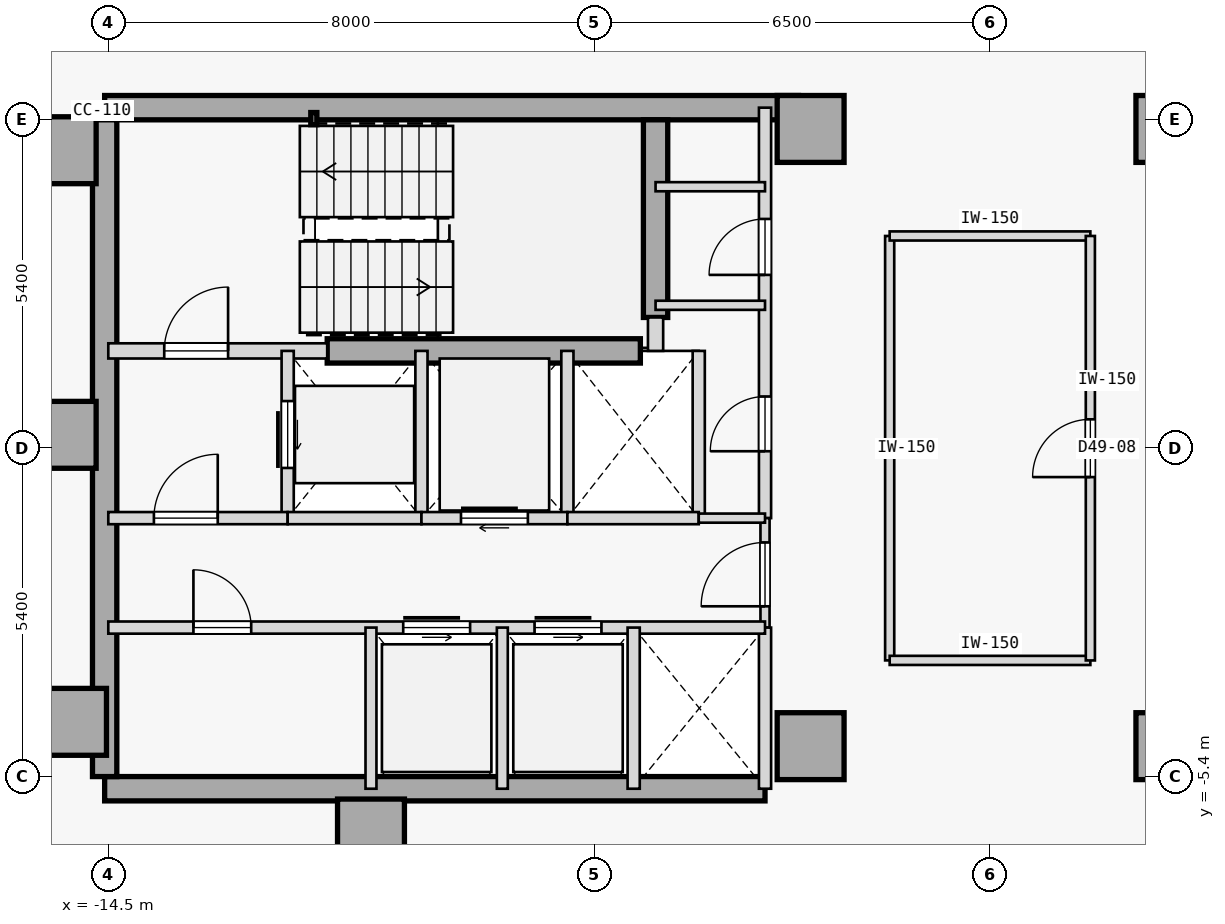
"""IFC4 building model, lengths in metres.
Left out: names, types, materials, properties, quantities, classifications, styles, units other than length and angle.
Written with IfcOpenShell. Run it as: python <this file> out.ifc"""

import sys

from ifc_helpers import new_model, si_unit, direction, frame, frame_2d, origin, origin_2d, place, context, subcontext, project, spatial, rectangle, hollow_rectangle, extrude, element, fill, save


model = new_model("IFC4")
c1 = context("Model", 3, precision=1e-05, world=origin(), true_north=direction((0.0, 1.0)))
c2 = subcontext(c1, "Body", "Model", "MODEL_VIEW")
j1 = project(units=[si_unit("LENGTHUNIT", "METRE"), si_unit("PLANEANGLEUNIT", "RADIAN")], contexts=[c1])
p1 = place(None, origin())
s1 = spatial("IfcSite", under=j1, at=p1, CompositionType="ELEMENT")
p2 = place(p1, origin())
s2 = spatial("IfcBuilding", under=s1, at=p2, CompositionType="ELEMENT")
p3 = place(p2, frame((0.0, 0.0, 188.8)))
s3 = spatial("IfcBuildingStorey", under=s2, at=p3, CompositionType="ELEMENT", Elevation=188.8)
for number, where, z_axis, x_axis in (
    (1, (-15.25, 4.9, 0.0), (0.0, 0.0, 1.0), (1.0, 0.0, 0.0)),
    (2, (-15.25, 0.22, 0.0), (0.0, 0.0, 1.0), (1.0, 0.0, 0.0)),
    (3, (-15.08, -4.5, 0.0), (0.0, 0.0, 1.0), (1.0, 0.0, 0.0)),
    (4, (-10.18, -6.32, 0.0), (0.0, 0.0, 1.0), (1.0, 0.0, 0.0)),
    (5, (-2.95, -4.9, 0.0), (0.0, 0.0, 1.0), (1.0, 0.0, 0.0)),
    (6, (-2.95, 5.25, 0.0), (0.0, 0.0, 1.0), (1.0, 0.0, 0.0)),
    (7, (2.95, -4.9, 0.0), (0.0, 0.0, 1.0), (1.0, 0.0, 0.0)),
    (8, (2.95, 5.25, 0.0), (0.0, 0.0, 1.0), (1.0, 0.0, 0.0)),
):
    element("IfcColumn", number, at=place(p3, frame(where, z_axis=z_axis, x_axis=x_axis)), inside=s3, PredefinedType="COLUMN", context=c2, shape_type="SweptSolid", body=[
        extrude(rectangle(XDim=1.1, YDim=1.1, at=origin_2d()), origin(), (0.0, 0.0, 1.0), 3.4),
    ])
p4 = place(p3, frame((-14.56, 5.6, 0.0), z_axis=(0.0, 0.0, 1.0), x_axis=(1.0, 0.0, 0.0)))
e9 = element("IfcWall", 9, at=p4, inside=s3, PredefinedType="SHEAR", context=c2, shape_type="SweptSolid", body=[
    extrude(rectangle(XDim=11.41, YDim=0.4, at=frame_2d((5.705, 0.0))), origin(), (0.0, 0.0, 1.0), 3.175),
])
p5 = place(p3, frame((-14.56, -5.6, 0.0), z_axis=(0.0, 0.0, 1.0), x_axis=(1.0, 0.0, 0.0)))
e10 = element("IfcWall", 10, at=p5, inside=s3, PredefinedType="SHEAR", context=c2, shape_type="SweptSolid", body=[
    extrude(rectangle(XDim=10.86, YDim=0.4, at=frame_2d((5.43, 0.0))), origin(), (0.0, 0.0, 1.0), 3.175),
])
p6 = place(p3, frame((-14.56, -5.4, 0.0), z_axis=(0.0, 0.0, 1.0), x_axis=(0.0, 1.0, 0.0)))
e11 = element("IfcWall", 11, at=p6, inside=s3, PredefinedType="SHEAR", context=c2, shape_type="SweptSolid", body=[
    extrude(rectangle(XDim=10.8, YDim=0.4, at=frame_2d((5.4, 0.0))), origin(), (0.0, 0.0, 1.0), 3.175),
])
p7 = place(p3, frame((-5.5, 2.15, 0.0), z_axis=(0.0, 0.0, 1.0), x_axis=(0.0, 1.0, 0.0)))
e12 = element("IfcWall", 12, at=p7, inside=s3, PredefinedType="SHEAR", context=c2, shape_type="SweptSolid", body=[
    extrude(rectangle(XDim=3.25, YDim=0.4, at=frame_2d((1.625, 0.0))), origin(), (0.0, 0.0, 1.0), 3.175),
])
p8 = place(p3, frame((-10.9, 1.6, 0.0), z_axis=(0.0, 0.0, 1.0), x_axis=(1.0, 0.0, 0.0)))
e13 = element("IfcWall", 13, at=p8, inside=s3, PredefinedType="SHEAR", context=c2, shape_type="SweptSolid", body=[
    extrude(rectangle(XDim=5.15, YDim=0.4, at=frame_2d((2.575, 0.0))), origin(), (0.0, 0.0, 1.0), 3.175),
])
p9 = place(p3, frame((-11.12, 5.42, 0.0), z_axis=(0.0, 0.0, 1.0), x_axis=(1.0, 0.0, 0.0)))
e14 = element("IfcColumn", 14, at=p9, inside=s3, PredefinedType="COLUMN", context=c2, shape_type="SweptSolid", body=[
    extrude(hollow_rectangle(XDim=0.1, YDim=0.2, WallThickness=0.008, at=origin_2d()), origin(), (0.0, 0.0, 1.0), 3.4),
])
p10 = place(p3, frame((-14.5, 1.6, 0.0), z_axis=(0.0, 0.0, 1.0), x_axis=(1.0, 0.0, 0.0)))
e15 = element("IfcWall", 15, at=p10, inside=s3, PredefinedType="STANDARD", context=c2, shape_type="SweptSolid", body=[
    extrude(rectangle(XDim=3.6, YDim=0.25, at=frame_2d((1.8, 0.0))), origin(), (0.0, 0.0, 1.0), 3.175),
])
p11 = place(p10, frame((0.92, 0.0, 0.0)))
e16 = element("IfcOpeningElement", 16, at=p11, cuts=e15, PredefinedType="OPENING", context=c2, shape_type="SweptSolid", body=[
    extrude(rectangle(XDim=1.05, YDim=2.15, at=frame_2d((0.525, 1.075))), frame((0.0, 0.135, 0.0), z_axis=(0.0, -1.0, 0.0), x_axis=(1.0, 0.0, 0.0)), (0.0, 0.0, 1.0), 0.27),
])
p12 = place(p3, frame((-5.5, 1.6, 0.0), z_axis=(0.0, 0.0, 1.0), x_axis=(0.0, 1.0, 0.0)))
e17 = element("IfcWall", 17, at=p12, inside=s3, PredefinedType="STANDARD", context=c2, shape_type="SweptSolid", body=[
    extrude(rectangle(XDim=0.55, YDim=0.25, at=frame_2d((0.275, 0.0))), origin(), (0.0, 0.0, 1.0), 3.175),
])
p13 = place(p3, frame((-3.7, -1.15, 0.0), z_axis=(0.0, 0.0, 1.0), x_axis=(0.0, 1.0, 0.0)))
e18 = element("IfcWall", 18, at=p13, inside=s3, PredefinedType="STANDARD", context=c2, shape_type="SweptSolid", body=[
    extrude(rectangle(XDim=6.75, YDim=0.2, at=frame_2d((3.375, 0.0))), origin(), (0.0, 0.0, 1.0), 3.175),
])
p14 = place(p13, frame((1.1, 0.0, 0.0)))
e19 = element("IfcOpeningElement", 19, at=p14, cuts=e18, PredefinedType="OPENING", context=c2, shape_type="SweptSolid", body=[
    extrude(rectangle(XDim=0.9, YDim=2.15, at=frame_2d((0.45, 1.075))), frame((0.0, 0.11, 0.0), z_axis=(0.0, -1.0, 0.0), x_axis=(1.0, 0.0, 0.0)), (0.0, 0.0, 1.0), 0.22),
])
p15 = place(p13, frame((4.0, 0.0, 0.0)))
e20 = element("IfcOpeningElement", 20, at=p15, cuts=e18, PredefinedType="OPENING", context=c2, shape_type="SweptSolid", body=[
    extrude(rectangle(XDim=0.92, YDim=2.15, at=frame_2d((0.46, 1.075))), frame((0.0, 0.11, 0.0), z_axis=(0.0, -1.0, 0.0), x_axis=(1.0, 0.0, 0.0)), (0.0, 0.0, 1.0), 0.22),
])
p16 = place(p3, frame((-3.7, -2.95, 0.0), z_axis=(0.0, 0.0, 1.0), x_axis=(0.0, 1.0, 0.0)))
e21 = element("IfcWall", 21, at=p16, inside=s3, PredefinedType="PARTITIONING", context=c2, shape_type="SweptSolid", body=[
    extrude(rectangle(XDim=1.8, YDim=0.15, at=frame_2d((0.9, 0.0))), origin(), (0.0, 0.0, 1.0), 3.175),
])
p17 = place(p16, frame((0.35, 0.0, 0.0)))
e22 = element("IfcOpeningElement", 22, at=p17, cuts=e21, PredefinedType="OPENING", context=c2, shape_type="SweptSolid", body=[
    extrude(rectangle(XDim=1.05, YDim=2.18, at=frame_2d((0.525, 1.09))), frame((0.0, 0.085, 0.0), z_axis=(0.0, -1.0, 0.0), x_axis=(1.0, 0.0, 0.0)), (0.0, 0.0, 1.0), 0.17),
])
p18 = place(p3, frame((-3.7, -5.6, 0.0), z_axis=(0.0, 0.0, 1.0), x_axis=(0.0, 1.0, 0.0)))
e23 = element("IfcWall", 23, at=p18, inside=s3, PredefinedType="STANDARD", context=c2, shape_type="SweptSolid", body=[
    extrude(rectangle(XDim=2.65, YDim=0.2, at=frame_2d((1.325, 0.0))), origin(), (0.0, 0.0, 1.0), 3.175),
])
p19 = place(p3, frame((-11.55, -1.15, 0.0), z_axis=(0.0, 0.0, 1.0), x_axis=(0.0, 1.0, 0.0)))
e24 = element("IfcWall", 24, at=p19, inside=s3, PredefinedType="STANDARD", context=c2, shape_type="SweptSolid", body=[
    extrude(rectangle(XDim=2.75, YDim=0.2, at=frame_2d((1.375, 0.0))), origin(), (0.0, 0.0, 1.0), 3.175),
])
p20 = place(p19, frame((0.825, 0.0, 0.0)))
e25 = element("IfcOpeningElement", 25, at=p20, cuts=e24, PredefinedType="OPENING", context=c2, shape_type="SweptSolid", body=[
    extrude(rectangle(XDim=1.1, YDim=2.15, at=frame_2d((0.55, 1.075))), frame((0.0, 0.11, 0.0), z_axis=(0.0, -1.0, 0.0), x_axis=(1.0, 0.0, 0.0)), (0.0, 0.0, 1.0), 0.22),
])
p21 = place(p3, frame((-9.35, -1.15, 0.0), z_axis=(0.0, 0.0, 1.0), x_axis=(0.0, 1.0, 0.0)))
e26 = element("IfcWall", 26, at=p21, inside=s3, PredefinedType="STANDARD", context=c2, shape_type="SweptSolid", body=[
    extrude(rectangle(XDim=2.75, YDim=0.2, at=frame_2d((1.375, 0.0))), origin(), (0.0, 0.0, 1.0), 3.175),
])
p22 = place(p3, frame((-14.5, -1.15, 0.0), z_axis=(0.0, 0.0, 1.0), x_axis=(1.0, 0.0, 0.0)))
e27 = element("IfcWall", 27, at=p22, inside=s3, PredefinedType="STANDARD", context=c2, shape_type="SweptSolid", body=[
    extrude(rectangle(XDim=2.95, YDim=0.2, at=frame_2d((1.475, 0.0))), origin(), (0.0, 0.0, 1.0), 3.175),
])
p23 = place(p22, frame((0.75, 0.0, 0.0)))
e28 = element("IfcOpeningElement", 28, at=p23, cuts=e27, PredefinedType="OPENING", context=c2, shape_type="SweptSolid", body=[
    extrude(rectangle(XDim=1.05, YDim=2.18, at=frame_2d((0.525, 1.09))), frame((0.0, 0.11, 0.0), z_axis=(0.0, -1.0, 0.0), x_axis=(1.0, 0.0, 0.0)), (0.0, 0.0, 1.0), 0.22),
])
p24 = place(p3, frame((-11.55, -1.15, 0.0), z_axis=(0.0, 0.0, 1.0), x_axis=(1.0, 0.0, 0.0)))
e29 = element("IfcWall", 29, at=p24, inside=s3, PredefinedType="STANDARD", context=c2, shape_type="SweptSolid", body=[
    extrude(rectangle(XDim=2.2, YDim=0.2, at=frame_2d((1.1, 0.0))), origin(), (0.0, 0.0, 1.0), 3.175),
])
p25 = place(p3, frame((-6.95, -1.15, 0.0), z_axis=(0.0, 0.0, 1.0), x_axis=(0.0, 1.0, 0.0)))
e30 = element("IfcWall", 30, at=p25, inside=s3, PredefinedType="STANDARD", context=c2, shape_type="SweptSolid", body=[
    extrude(rectangle(XDim=2.75, YDim=0.2, at=frame_2d((1.375, 0.0))), origin(), (0.0, 0.0, 1.0), 3.175),
])
p26 = place(p3, frame((-9.35, -1.15, 0.0), z_axis=(0.0, 0.0, 1.0), x_axis=(1.0, 0.0, 0.0)))
e31 = element("IfcWall", 31, at=p26, inside=s3, PredefinedType="STANDARD", context=c2, shape_type="SweptSolid", body=[
    extrude(rectangle(XDim=2.4, YDim=0.2, at=frame_2d((1.2, 0.0))), origin(), (0.0, 0.0, 1.0), 3.175),
])
p27 = place(p26, frame((0.65, 0.0, 0.0)))
e32 = element("IfcOpeningElement", 32, at=p27, cuts=e31, PredefinedType="OPENING", context=c2, shape_type="SweptSolid", body=[
    extrude(rectangle(XDim=1.1, YDim=2.15, at=frame_2d((0.55, 1.075))), frame((0.0, 0.11, 0.0), z_axis=(0.0, -1.0, 0.0), x_axis=(1.0, 0.0, 0.0)), (0.0, 0.0, 1.0), 0.22),
])
p28 = place(p3, frame((-4.79, -1.15, 0.0), z_axis=(0.0, 0.0, 1.0), x_axis=(0.0, 1.0, 0.0)))
e33 = element("IfcWall", 33, at=p28, inside=s3, PredefinedType="STANDARD", context=c2, shape_type="SweptSolid", body=[
    extrude(rectangle(XDim=2.75, YDim=0.2, at=frame_2d((1.375, 0.0))), origin(), (0.0, 0.0, 1.0), 3.175),
])
p29 = place(p3, frame((-6.95, -1.15, 0.0), z_axis=(0.0, 0.0, 1.0), x_axis=(1.0, 0.0, 0.0)))
e34 = element("IfcWall", 34, at=p29, inside=s3, PredefinedType="STANDARD", context=c2, shape_type="SweptSolid", body=[
    extrude(rectangle(XDim=2.16, YDim=0.2, at=frame_2d((1.08, 0.0))), origin(), (0.0, 0.0, 1.0), 3.175),
])
p30 = place(p3, frame((-4.79, -1.15, 0.0), z_axis=(0.0, 0.0, 1.0), x_axis=(1.0, 0.0, 0.0)))
e35 = element("IfcWall", 35, at=p30, inside=s3, PredefinedType="PARTITIONING", context=c2, shape_type="SweptSolid", body=[
    extrude(rectangle(XDim=1.09, YDim=0.15, at=frame_2d((0.545, 0.0))), origin(), (0.0, 0.0, 1.0), 3.175),
])
p31 = place(p3, frame((-14.5, -2.95, 0.0), z_axis=(0.0, 0.0, 1.0), x_axis=(1.0, 0.0, 0.0)))
e36 = element("IfcWall", 36, at=p31, inside=s3, PredefinedType="STANDARD", context=c2, shape_type="SweptSolid", body=[
    extrude(rectangle(XDim=10.8, YDim=0.2, at=frame_2d((5.4, 0.0))), origin(), (0.0, 0.0, 1.0), 3.175),
])
p32 = place(p31, frame((4.85, 0.0, 0.0)))
e37 = element("IfcOpeningElement", 37, at=p32, cuts=e36, PredefinedType="OPENING", context=c2, shape_type="SweptSolid", body=[
    extrude(rectangle(XDim=1.1, YDim=2.15, at=frame_2d((0.55, 1.075))), frame((0.0, 0.11, 0.0), z_axis=(0.0, -1.0, 0.0), x_axis=(1.0, 0.0, 0.0)), (0.0, 0.0, 1.0), 0.22),
])
p33 = place(p31, frame((7.01, 0.0, 0.0)))
e38 = element("IfcOpeningElement", 38, at=p33, cuts=e36, PredefinedType="OPENING", context=c2, shape_type="SweptSolid", body=[
    extrude(rectangle(XDim=1.1, YDim=2.15, at=frame_2d((0.55, 1.075))), frame((0.0, 0.11, 0.0), z_axis=(0.0, -1.0, 0.0), x_axis=(1.0, 0.0, 0.0)), (0.0, 0.0, 1.0), 0.22),
])
p34 = place(p31, frame((1.4, 0.0, 0.0)))
e39 = element("IfcOpeningElement", 39, at=p34, cuts=e36, PredefinedType="OPENING", context=c2, shape_type="SweptSolid", body=[
    extrude(rectangle(XDim=0.95, YDim=2.15, at=frame_2d((0.475, 1.075))), frame((0.0, 0.11, 0.0), z_axis=(0.0, -1.0, 0.0), x_axis=(1.0, 0.0, 0.0)), (0.0, 0.0, 1.0), 0.22),
])
p35 = place(p3, frame((-5.86, -5.6, 0.0), z_axis=(0.0, 0.0, 1.0), x_axis=(0.0, 1.0, 0.0)))
e40 = element("IfcWall", 40, at=p35, inside=s3, PredefinedType="STANDARD", context=c2, shape_type="SweptSolid", body=[
    extrude(rectangle(XDim=2.65, YDim=0.2, at=frame_2d((1.325, 0.0))), origin(), (0.0, 0.0, 1.0), 3.175),
])
for number, where, z_axis, x_axis in (
    (41, (-10.18, -5.6, 0.0), (0.0, 0.0, 1.0), (0.0, 1.0, 0.0)),
    (42, (-8.02, -5.6, 0.0), (0.0, 0.0, 1.0), (0.0, 1.0, 0.0)),
):
    element("IfcWall", number, at=place(p3, frame(where, z_axis=z_axis, x_axis=x_axis)), inside=s3, PredefinedType="STANDARD", context=c2, shape_type="SweptSolid", body=[
        extrude(rectangle(XDim=2.65, YDim=0.18, at=frame_2d((1.325, 0.0))), origin(), (0.0, 0.0, 1.0), 3.175),
    ])
for number, where, z_axis, x_axis in (
    (43, (-5.5, 4.3, 0.0), (0.0, 0.0, 1.0), (1.0, 0.0, 0.0)),
    (44, (-5.5, 2.35, 0.0), (0.0, 0.0, 1.0), (1.0, 0.0, 0.0)),
):
    element("IfcWall", number, at=place(p3, frame(where, z_axis=z_axis, x_axis=x_axis)), inside=s3, PredefinedType="PARTITIONING", context=c2, shape_type="SweptSolid", body=[
        extrude(rectangle(XDim=1.8, YDim=0.15, at=frame_2d((0.9, 0.0))), origin(), (0.0, 0.0, 1.0), 3.175),
    ])
p36 = place(p3, frame((-1.65, -3.49, 0.0), z_axis=(0.0, 0.0, 1.0), x_axis=(-3.4979712e-05, 0.999999999388, 0.0)))
e45 = element("IfcWall", 45, at=p36, inside=s3, PredefinedType="PARTITIONING", context=c2, shape_type="SweptSolid", body=[
    extrude(rectangle(XDim=6.979, YDim=0.15, at=frame_2d((3.49, 0.0))), origin(), (0.0, 0.0, 1.0), 3.175),
])
p37 = place(p3, frame((-1.65, -3.49, 0.0), z_axis=(0.0, 0.0, 1.0), x_axis=(0.999999975374, -0.000221926315, 0.0)))
e46 = element("IfcWall", 46, at=p37, inside=s3, PredefinedType="PARTITIONING", context=c2, shape_type="SweptSolid", body=[
    extrude(rectangle(XDim=3.3, YDim=0.15, at=frame_2d((1.65, 0.0))), origin(), (0.0, 0.0, 1.0), 3.175),
])
p38 = place(p3, frame((-1.65, 3.49, 0.0), z_axis=(0.0, 0.0, 1.0), x_axis=(1.0, 0.0, 0.0)))
e47 = element("IfcWall", 47, at=p38, inside=s3, PredefinedType="PARTITIONING", context=c2, shape_type="SweptSolid", body=[
    extrude(rectangle(XDim=3.3, YDim=0.15, at=frame_2d((1.65, 0.0))), origin(), (0.0, 0.0, 1.0), 3.175),
])
p39 = place(p3, frame((1.65, -3.49, 0.0), z_axis=(0.0, 0.0, 1.0), x_axis=(-6.9952083e-05, 0.999999997553, 0.0)))
e48 = element("IfcWall", 48, at=p39, inside=s3, PredefinedType="PARTITIONING", context=c2, shape_type="SweptSolid", body=[
    extrude(rectangle(XDim=6.98, YDim=0.15, at=frame_2d((3.49, 0.0))), origin(), (0.0, 0.0, 1.0), 3.175),
])
p40 = place(p39, frame((3.015, 0.0, 0.0)))
e49 = element("IfcOpeningElement", 49, at=p40, cuts=e48, PredefinedType="OPENING", context=c2, shape_type="SweptSolid", body=[
    extrude(rectangle(XDim=0.95, YDim=2.15, at=frame_2d((0.475, 1.075))), frame((0.0, 0.085, 0.0), z_axis=(0.0, -1.0, 0.0), x_axis=(1.0, 0.0, 0.0)), (0.0, 0.0, 1.0), 0.17),
])
p41 = place(p11, origin())
e50 = element("IfcDoor", 50, at=p41, inside=s3, OperationType="SINGLE_SWING_RIGHT", PredefinedType="DOOR", context=c2, shape_type="SweptSolid", body=[
    extrude(rectangle(XDim=1.05, YDim=2.15, at=frame_2d((0.525, 1.075))), frame((0.0, 0.025, 0.0), z_axis=(0.0, -1.0, 0.0), x_axis=(1.0, 0.0, 0.0)), (0.0, 0.0, 1.0), 0.05),
])
fill(e16, e50)
p42 = place(p23, origin())
e51 = element("IfcDoor", 51, at=p42, inside=s3, OperationType="SINGLE_SWING_RIGHT", PredefinedType="DOOR", context=c2, shape_type="SweptSolid", body=[
    extrude(rectangle(XDim=1.05, YDim=2.18, at=frame_2d((0.525, 1.09))), frame((0.0, 0.025, 0.0), z_axis=(0.0, -1.0, 0.0), x_axis=(1.0, 0.0, 0.0)), (0.0, 0.0, 1.0), 0.05),
])
fill(e28, e51)
p43 = place(p17, origin())
e52 = element("IfcDoor", 52, at=p43, inside=s3, OperationType="SINGLE_SWING_LEFT", PredefinedType="DOOR", context=c2, shape_type="SweptSolid", body=[
    extrude(rectangle(XDim=1.05, YDim=2.18, at=frame_2d((0.525, 1.09))), frame((0.0, 0.025, 0.0), z_axis=(0.0, -1.0, 0.0), x_axis=(1.0, 0.0, 0.0)), (0.0, 0.0, 1.0), 0.05),
])
fill(e22, e52)
p44 = place(p20, origin())
e53 = element("IfcDoor", 53, at=p44, inside=s3, OperationType="SLIDING_TO_RIGHT", PredefinedType="DOOR", context=c2, shape_type="SweptSolid", body=[
    extrude(rectangle(XDim=1.1, YDim=2.15, at=frame_2d((0.55, 1.075))), frame((0.0, 0.025, 0.0), z_axis=(0.0, -1.0, 0.0), x_axis=(1.0, 0.0, 0.0)), (0.0, 0.0, 1.0), 0.05),
])
fill(e25, e53)
p45 = place(p27, origin())
e54 = element("IfcDoor", 54, at=p45, inside=s3, OperationType="SLIDING_TO_RIGHT", PredefinedType="DOOR", context=c2, shape_type="SweptSolid", body=[
    extrude(rectangle(XDim=1.1, YDim=2.15, at=frame_2d((0.55, 1.075))), frame((0.0, 0.025, 0.0), z_axis=(0.0, -1.0, 0.0), x_axis=(1.0, 0.0, 0.0)), (0.0, 0.0, 1.0), 0.05),
])
fill(e32, e54)
p46 = place(p32, origin())
e55 = element("IfcDoor", 55, at=p46, inside=s3, OperationType="SLIDING_TO_LEFT", PredefinedType="DOOR", context=c2, shape_type="SweptSolid", body=[
    extrude(rectangle(XDim=1.1, YDim=2.15, at=frame_2d((0.55, 1.075))), frame((0.0, 0.025, 0.0), z_axis=(0.0, -1.0, 0.0), x_axis=(1.0, 0.0, 0.0)), (0.0, 0.0, 1.0), 0.05),
])
fill(e37, e55)
p47 = place(p33, origin())
e56 = element("IfcDoor", 56, at=p47, inside=s3, OperationType="SLIDING_TO_LEFT", PredefinedType="DOOR", context=c2, shape_type="SweptSolid", body=[
    extrude(rectangle(XDim=1.1, YDim=2.15, at=frame_2d((0.55, 1.075))), frame((0.0, 0.025, 0.0), z_axis=(0.0, -1.0, 0.0), x_axis=(1.0, 0.0, 0.0)), (0.0, 0.0, 1.0), 0.05),
])
fill(e38, e56)
p48 = place(p34, origin())
e57 = element("IfcDoor", 57, at=p48, inside=s3, OperationType="SINGLE_SWING_LEFT", PredefinedType="DOOR", context=c2, shape_type="SweptSolid", body=[
    extrude(rectangle(XDim=0.95, YDim=2.15, at=frame_2d((0.475, 1.075))), frame((0.0, 0.025, 0.0), z_axis=(0.0, -1.0, 0.0), x_axis=(1.0, 0.0, 0.0)), (0.0, 0.0, 1.0), 0.05),
])
fill(e39, e57)
p49 = place(p14, origin())
e58 = element("IfcDoor", 58, at=p49, inside=s3, OperationType="SINGLE_SWING_LEFT", PredefinedType="DOOR", context=c2, shape_type="SweptSolid", body=[
    extrude(rectangle(XDim=0.9, YDim=2.15, at=frame_2d((0.45, 1.075))), frame((0.0, 0.025, 0.0), z_axis=(0.0, -1.0, 0.0), x_axis=(1.0, 0.0, 0.0)), (0.0, 0.0, 1.0), 0.05),
])
fill(e19, e58)
p50 = place(p15, origin())
e59 = element("IfcDoor", 59, at=p50, inside=s3, OperationType="SINGLE_SWING_LEFT", PredefinedType="DOOR", context=c2, shape_type="SweptSolid", body=[
    extrude(rectangle(XDim=0.92, YDim=2.15, at=frame_2d((0.46, 1.075))), frame((0.0, 0.025, 0.0), z_axis=(0.0, -1.0, 0.0), x_axis=(1.0, 0.0, 0.0)), (0.0, 0.0, 1.0), 0.05),
])
fill(e20, e59)
p51 = place(p40, origin())
e60 = element("IfcDoor", 60, at=p51, inside=s3, OperationType="SINGLE_SWING_LEFT", PredefinedType="DOOR", context=c2, shape_type="SweptSolid", body=[
    extrude(rectangle(XDim=0.95, YDim=2.15, at=frame_2d((0.475, 1.075))), frame((0.0, 0.025, 0.0), z_axis=(0.0, -1.0, 0.0), x_axis=(1.0, 0.0, 0.0)), (0.0, 0.0, 1.0), 0.05),
])
fill(e49, e60)
save(model, sys.argv[1])
